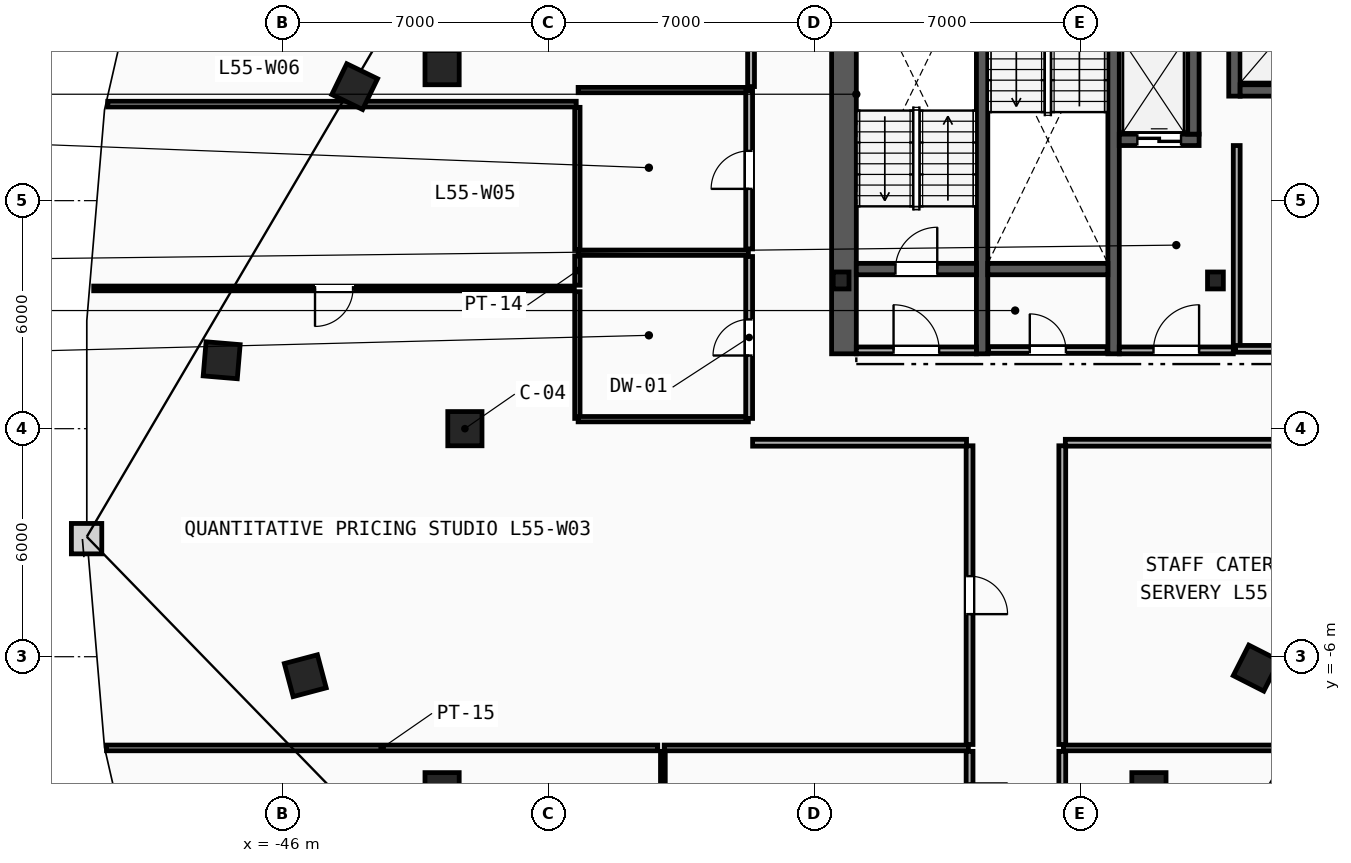
"""IFC4 building model, lengths in metres.
Left out: names, types, materials, properties, quantities, classifications, styles, units other than length and angle.
Written with IfcOpenShell. Run it as: python <this file> out.ifc"""

import sys

from ifc_helpers import new_model, si_unit, direction, frame, frame_2d, origin, origin_2d, place, context, subcontext, project, spatial, rectangle, i_section, extrude, element, fill, save


model = new_model("IFC4")
c1 = context("Model", 3, precision=1e-05, world=origin(), true_north=direction((0.0, 1.0)))
c2 = subcontext(c1, "Body", "Model", "MODEL_VIEW")
j1 = project(units=[si_unit("LENGTHUNIT", "METRE"), si_unit("PLANEANGLEUNIT", "RADIAN")], contexts=[c1])
p1 = place(None, origin())
s1 = spatial("IfcSite", under=j1, at=p1, CompositionType="ELEMENT")
p2 = place(p1, origin())
s2 = spatial("IfcBuilding", under=s1, at=p2, CompositionType="ELEMENT")
p3 = place(p2, frame((0.0, 0.0, 209.8)))
s3 = spatial("IfcBuildingStorey", under=s2, at=p3, CompositionType="ELEMENT", Elevation=209.8)
for number, where, z_axis, x_axis in (
    (1, (-31.3, 3.9, 0.0), (0.0, 0.0, 1.0), (1.0, 0.0, 0.0)),
    (2, (-21.45, 3.9, 0.0), (0.0, 0.0, 1.0), (1.0, 0.0, 0.0)),
):
    element("IfcColumn", number, at=place(p3, frame(where, z_axis=z_axis, x_axis=x_axis)), inside=s3, PredefinedType="COLUMN", context=c2, shape_type="SweptSolid", body=[
        extrude(i_section(OverallWidth=0.416, OverallDepth=0.446, WebThickness=0.039, FlangeThickness=0.063, FilletRadius=0.018, at=origin_2d()), origin(), (0.0, 0.0, 1.0), 3.6),
    ])
for number, where, z_axis, x_axis in (
    (3, (-41.2, 0.0, 0.0), (0.0, 0.0, 1.0), (1.0, 0.0, 0.0)),
    (4, (-41.8, 9.5, 0.0), (0.0, 0.0, 1.0), (1.0, 0.0, 0.0)),
    (5, (-41.8, -9.5, 0.0), (0.0, 0.0, 1.0), (1.0, 0.0, 0.0)),
    (6, (-23.2, -9.5, 0.0), (0.0, 0.0, 1.0), (1.0, 0.0, 0.0)),
    (7, (-44.1, 9.0, 0.0), (0.0, 0.0, 1.0), (-0.437, -0.899, 0.0)),
    (8, (-47.6, 1.8, 0.0), (0.0, 0.0, 1.0), (-0.084, -0.997, 0.0)),
    (9, (-45.4, -6.5, 0.0), (0.0, 0.0, 1.0), (0.256, -0.967, 0.0)),
    (10, (-20.375, -6.3, 0.0), (0.0, 0.0, 1.0), (0.453, 0.892, 0.0)),
):
    element("IfcColumn", number, at=place(p3, frame(where, z_axis=z_axis, x_axis=x_axis)), inside=s3, PredefinedType="COLUMN", context=c2, shape_type="SweptSolid", body=[
        extrude(rectangle(XDim=0.9, YDim=0.9, at=origin_2d()), origin(), (0.0, 0.0, 1.0), 3.6),
    ])
p4 = place(p3, frame((-31.225, 1.97, 0.0), z_axis=(0.0, 0.0, 1.0), x_axis=(0.0, 1.0, 0.0)))
e11 = element("IfcWall", 11, at=p4, inside=s3, PredefinedType="SHEAR", context=c2, shape_type="SweptSolid", body=[
    extrude(rectangle(XDim=13.33, YDim=0.65, at=frame_2d((6.665, 0.0))), origin(), (0.0, 0.0, 1.0), 3.34),
])
for number, where, z_axis, x_axis in (
    (12, (-27.59, 1.97, 0.0), (0.0, 0.0, 1.0), (0.0, 1.0, 0.0)),
    (13, (-24.13, 1.97, 0.0), (0.0, 0.0, 1.0), (0.0, 1.0, 0.0)),
):
    element("IfcWall", number, at=place(p3, frame(where, z_axis=z_axis, x_axis=x_axis)), inside=s3, PredefinedType="SHEAR", context=c2, shape_type="SweptSolid", body=[
        extrude(rectangle(XDim=10.68, YDim=0.3, at=frame_2d((5.34, 0.0))), origin(), (0.0, 0.0, 1.0), 3.34),
    ])
p5 = place(p3, frame((-30.9, 4.2, 0.0), z_axis=(0.0, 0.0, 1.0), x_axis=(1.0, 0.0, 0.0)))
e14 = element("IfcWall", 14, at=p5, inside=s3, PredefinedType="SHEAR", context=c2, shape_type="SweptSolid", body=[
    extrude(rectangle(XDim=3.16, YDim=0.3, at=frame_2d((1.58, 0.0))), origin(), (0.0, 0.0, 1.0), 3.34),
])
p6 = place(p5, frame((1.03, 0.0, 0.0)))
e15 = element("IfcOpeningElement", 15, at=p6, cuts=e14, PredefinedType="OPENING", context=c2, shape_type="SweptSolid", body=[
    extrude(rectangle(XDim=1.1, YDim=2.15, at=frame_2d((0.55, 1.075))), frame((0.0, 0.16, 0.0), z_axis=(0.0, -1.0, 0.0), x_axis=(1.0, 0.0, 0.0)), (0.0, 0.0, 1.0), 0.32),
])
p7 = place(p3, frame((-27.44, 4.2, 0.0), z_axis=(0.0, 0.0, 1.0), x_axis=(1.0, 0.0, 0.0)))
e16 = element("IfcWall", 16, at=p7, inside=s3, PredefinedType="SHEAR", context=c2, shape_type="SweptSolid", body=[
    extrude(rectangle(XDim=3.16, YDim=0.3, at=frame_2d((1.58, 0.0))), origin(), (0.0, 0.0, 1.0), 3.34),
])
p8 = place(p3, frame((-20.89, 2.15, 0.0), z_axis=(0.0, 0.0, 1.0), x_axis=(0.0, 1.0, 0.0)))
e17 = element("IfcWall", 17, at=p8, inside=s3, PredefinedType="PARTITIONING", context=c2, shape_type="SweptSolid", body=[
    extrude(rectangle(XDim=5.3, YDim=0.18, at=frame_2d((2.65, 0.0))), origin(), (0.0, 0.0, 1.0), 3.34),
])
p9 = place(p3, frame((-23.98, 2.06, 0.0), z_axis=(0.0, 0.0, 1.0), x_axis=(1.0, 0.0, 0.0)))
e18 = element("IfcWall", 18, at=p9, inside=s3, PredefinedType="PARTITIONING", context=c2, shape_type="SweptSolid", body=[
    extrude(rectangle(XDim=3.0, YDim=0.18, at=frame_2d((1.5, 0.0))), origin(), (0.0, 0.0, 1.0), 3.34),
])
p10 = place(p9, frame((0.9, 0.0, 0.0)))
e19 = element("IfcOpeningElement", 19, at=p10, cuts=e18, PredefinedType="OPENING", context=c2, shape_type="SweptSolid", body=[
    extrude(rectangle(XDim=1.2, YDim=2.15, at=frame_2d((0.6, 1.075))), frame((0.0, 0.1, 0.0), z_axis=(0.0, -1.0, 0.0), x_axis=(1.0, 0.0, 0.0)), (0.0, 0.0, 1.0), 0.2),
])
p11 = place(p3, frame((-30.9, 2.06, 0.0), z_axis=(0.0, 0.0, 1.0), x_axis=(1.0, 0.0, 0.0)))
e20 = element("IfcWall", 20, at=p11, inside=s3, PredefinedType="PARTITIONING", context=c2, shape_type="SweptSolid", body=[
    extrude(rectangle(XDim=3.16, YDim=0.18, at=frame_2d((1.58, 0.0))), origin(), (0.0, 0.0, 1.0), 3.34),
])
p12 = place(p11, frame((0.98, 0.0, 0.0)))
e21 = element("IfcOpeningElement", 21, at=p12, cuts=e20, PredefinedType="OPENING", context=c2, shape_type="SweptSolid", body=[
    extrude(rectangle(XDim=1.2, YDim=2.15, at=frame_2d((0.6, 1.075))), frame((0.0, 0.1, 0.0), z_axis=(0.0, -1.0, 0.0), x_axis=(1.0, 0.0, 0.0)), (0.0, 0.0, 1.0), 0.2),
])
p13 = place(p3, frame((-23.98, 7.6, 0.0), z_axis=(0.0, 0.0, 1.0), x_axis=(1.0, 0.0, 0.0)))
e22 = element("IfcWall", 22, at=p13, inside=s3, PredefinedType="SHEAR", context=c2, shape_type="SweptSolid", body=[
    extrude(rectangle(XDim=2.1, YDim=0.3, at=frame_2d((1.05, 0.0))), origin(), (0.0, 0.0, 1.0), 3.34),
])
p14 = place(p13, frame((0.475, 0.0, 0.0)))
e23 = element("IfcOpeningElement", 23, at=p14, cuts=e22, PredefinedType="OPENING", context=c2, shape_type="SweptSolid", body=[
    extrude(rectangle(XDim=1.15, YDim=2.2, at=frame_2d((0.575, 1.1))), frame((0.0, 0.16, 0.0), z_axis=(0.0, -1.0, 0.0), x_axis=(1.0, 0.0, 0.0)), (0.0, 0.0, 1.0), 0.32),
])
p15 = place(p3, frame((-22.03, 7.75, 0.0), z_axis=(0.0, 0.0, 1.0), x_axis=(0.0, 1.0, 0.0)))
e24 = element("IfcWall", 24, at=p15, inside=s3, PredefinedType="SHEAR", context=c2, shape_type="SweptSolid", body=[
    extrude(rectangle(XDim=2.5, YDim=0.3, at=frame_2d((1.25, 0.0))), origin(), (0.0, 0.0, 1.0), 3.34),
])
p16 = place(p3, frame((-20.95, 8.75, 0.0), z_axis=(0.0, 0.0, 1.0), x_axis=(0.0, 1.0, 0.0)))
e25 = element("IfcWall", 25, at=p16, inside=s3, PredefinedType="SHEAR", context=c2, shape_type="SweptSolid", body=[
    extrude(rectangle(XDim=5.25, YDim=0.3, at=frame_2d((2.625, 0.0))), origin(), (0.0, 0.0, 1.0), 3.34),
])
p17 = place(p3, frame((-20.8, 8.9, 0.0), z_axis=(0.0, 0.0, 1.0), x_axis=(1.0, 0.0, 0.0)))
e26 = element("IfcWall", 26, at=p17, inside=s3, PredefinedType="SHEAR", context=c2, shape_type="SweptSolid", body=[
    extrude(rectangle(XDim=2.15, YDim=0.3, at=frame_2d((1.075, 0.0))), origin(), (0.0, 0.0, 1.0), 3.34),
])
p18 = place(p3, frame((-27.42, 2.07, 0.0), z_axis=(0.0, 0.0, 1.0), x_axis=(1.0, 0.0, 0.0)))
e27 = element("IfcWall", 27, at=p18, inside=s3, PredefinedType="PARTITIONING", context=c2, shape_type="SweptSolid", body=[
    extrude(rectangle(XDim=3.12, YDim=0.18, at=frame_2d((1.56, 0.0))), origin(), (0.0, 0.0, 1.0), 3.34),
])
p19 = place(p18, frame((1.085, 0.0, 0.0)))
e28 = element("IfcOpeningElement", 28, at=p19, cuts=e27, PredefinedType="OPENING", context=c2, shape_type="SweptSolid", body=[
    extrude(rectangle(XDim=0.95, YDim=2.1, at=frame_2d((0.475, 1.05))), frame((0.0, 0.1, 0.0), z_axis=(0.0, -1.0, 0.0), x_axis=(1.0, 0.0, 0.0)), (0.0, 0.0, 1.0), 0.2),
])
p20 = place(p3, frame((-38.24, 0.27, 0.0), z_axis=(0.0, 0.0, 1.0), x_axis=(0.0, 1.0, 0.0)))
e29 = element("IfcWall", 29, at=p20, inside=s3, PredefinedType="PARTITIONING", context=c2, shape_type="SweptSolid", body=[
    extrude(rectangle(XDim=3.335, YDim=0.14, at=frame_2d((1.667, 0.0))), origin(), (0.0, 0.0, 1.0), 3.34),
])
p21 = place(p3, frame((-38.24, 3.775, 0.0), z_axis=(0.0, 0.0, 1.0), x_axis=(0.0, 1.0, 0.0)))
e30 = element("IfcWall", 30, at=p21, inside=s3, PredefinedType="PARTITIONING", context=c2, shape_type="SweptSolid", body=[
    extrude(rectangle(XDim=0.77, YDim=0.14, at=frame_2d((0.385, 0.0))), origin(), (0.0, 0.0, 1.0), 3.34),
])
p22 = place(p3, frame((-38.24, 4.715, 0.0), z_axis=(0.0, 0.0, 1.0), x_axis=(0.0, 1.0, 0.0)))
e31 = element("IfcWall", 31, at=p22, inside=s3, PredefinedType="PARTITIONING", context=c2, shape_type="SweptSolid", body=[
    extrude(rectangle(XDim=3.74, YDim=0.14, at=frame_2d((1.87, 0.0))), origin(), (0.0, 0.0, 1.0), 3.34),
])
for number, where, z_axis, x_axis in (
    (32, (-38.22, 0.25, 0.0), (0.0, 0.0, 1.0), (1.0, 0.0, 0.0)),
    (33, (-38.22, 4.63, 0.0), (0.0, 0.0, 1.0), (1.0, 0.0, 0.0)),
    (34, (-38.22, 8.91, 0.0), (0.0, 0.0, 1.0), (1.0, 0.0, 0.0)),
):
    element("IfcWall", number, at=place(p3, frame(where, z_axis=z_axis, x_axis=x_axis)), inside=s3, PredefinedType="PARTITIONING", context=c2, shape_type="SweptSolid", body=[
        extrude(rectangle(XDim=4.48, YDim=0.14, at=frame_2d((2.24, 0.0))), origin(), (0.0, 0.0, 1.0), 3.34),
    ])
p23 = place(p3, frame((-33.72, 0.27, 0.0), z_axis=(0.0, 0.0, 1.0), x_axis=(0.0, 1.0, 0.0)))
e35 = element("IfcWall", 35, at=p23, inside=s3, PredefinedType="PARTITIONING", context=c2, shape_type="SweptSolid", body=[
    extrude(rectangle(XDim=4.26, YDim=0.18, at=frame_2d((2.13, 0.0))), origin(), (0.0, 0.0, 1.0), 3.34),
])
p24 = place(p23, frame((1.655, 0.0, 0.0)))
e36 = element("IfcOpeningElement", 36, at=p24, cuts=e35, PredefinedType="OPENING", context=c2, shape_type="SweptSolid", body=[
    extrude(rectangle(XDim=0.95, YDim=2.1, at=frame_2d((0.475, 1.05))), frame((0.0, 0.1, 0.0), z_axis=(0.0, -1.0, 0.0), x_axis=(1.0, 0.0, 0.0)), (0.0, 0.0, 1.0), 0.2),
])
p25 = place(p3, frame((-33.72, 4.73, 0.0), z_axis=(0.0, 0.0, 1.0), x_axis=(0.0, 1.0, 0.0)))
e37 = element("IfcWall", 37, at=p25, inside=s3, PredefinedType="PARTITIONING", context=c2, shape_type="SweptSolid", body=[
    extrude(rectangle(XDim=4.16, YDim=0.18, at=frame_2d((2.08, 0.0))), origin(), (0.0, 0.0, 1.0), 3.34),
])
p26 = place(p25, frame((1.58, 0.0, 0.0)))
e38 = element("IfcOpeningElement", 38, at=p26, cuts=e37, PredefinedType="OPENING", context=c2, shape_type="SweptSolid", body=[
    extrude(rectangle(XDim=1.0, YDim=2.15, at=frame_2d((0.5, 1.075))), frame((0.0, 0.1, 0.0), z_axis=(0.0, -1.0, 0.0), x_axis=(1.0, 0.0, 0.0)), (0.0, 0.0, 1.0), 0.2),
])
p27 = place(p3, frame((-50.63, -8.4, 0.0), z_axis=(0.0, 0.0, 1.0), x_axis=(1.0, 0.0, 0.0)))
e39 = element("IfcWall", 39, at=p27, inside=s3, PredefinedType="PARTITIONING", context=c2, shape_type="SweptSolid", body=[
    extrude(rectangle(XDim=14.505, YDim=0.15, at=frame_2d((7.252, 0.0))), origin(), (0.0, 0.0, 1.0), 3.34),
])
p28 = place(p3, frame((-35.955, -8.4, 0.0), z_axis=(0.0, 0.0, 1.0), x_axis=(1.0, 0.0, 0.0)))
e40 = element("IfcWall", 40, at=p28, inside=s3, PredefinedType="PARTITIONING", context=c2, shape_type="SweptSolid", body=[
    extrude(rectangle(XDim=8.005, YDim=0.15, at=frame_2d((4.002, 0.0))), origin(), (0.0, 0.0, 1.0), 3.34),
])
p29 = place(p3, frame((-25.45, -8.4, 0.0), z_axis=(0.0, 0.0, 1.0), x_axis=(1.0, 0.0, 0.0)))
e41 = element("IfcWall", 41, at=p29, inside=s3, PredefinedType="PARTITIONING", context=c2, shape_type="SweptSolid", body=[
    extrude(rectangle(XDim=12.08, YDim=0.15, at=frame_2d((6.04, 0.0))), origin(), (0.0, 0.0, 1.0), 3.34),
])
p30 = place(p3, frame((-50.598, 8.54, 0.0), z_axis=(0.0, 0.0, 1.0), x_axis=(1.0, 0.0, 0.0)))
e42 = element("IfcWall", 42, at=p30, inside=s3, PredefinedType="PARTITIONING", context=c2, shape_type="SweptSolid", body=[
    extrude(rectangle(XDim=12.328, YDim=0.15, at=frame_2d((6.164, 0.0))), origin(), (0.0, 0.0, 1.0), 3.34),
])
p31 = place(p3, frame((-27.92, -8.49, 0.0), z_axis=(0.0, 0.0, 1.0), x_axis=(0.0, -1.0, 0.0)))
e43 = element("IfcWall", 43, at=p31, inside=s3, PredefinedType="PARTITIONING", context=c2, shape_type="SweptSolid", body=[
    extrude(rectangle(XDim=2.688, YDim=0.18, at=frame_2d((1.344, 0.0))), origin(), (0.0, 0.0, 1.0), 3.34),
])
p32 = place(p31, frame((0.844, 0.0, 0.0)))
e44 = element("IfcOpeningElement", 44, at=p32, cuts=e43, PredefinedType="OPENING", context=c2, shape_type="SweptSolid", body=[
    extrude(rectangle(XDim=1.0, YDim=2.15, at=frame_2d((0.5, 1.075))), frame((0.0, 0.1, 0.0), z_axis=(0.0, -1.0, 0.0), x_axis=(1.0, 0.0, 0.0)), (0.0, 0.0, 1.0), 0.2),
])
p33 = place(p3, frame((-25.48, -11.178, 0.0), z_axis=(0.0, 0.0, 1.0), x_axis=(0.0, 1.0, 0.0)))
e45 = element("IfcWall", 45, at=p33, inside=s3, PredefinedType="PARTITIONING", context=c2, shape_type="SweptSolid", body=[
    extrude(rectangle(XDim=2.688, YDim=0.18, at=frame_2d((1.344, 0.0))), origin(), (0.0, 0.0, 1.0), 3.34),
])
p34 = place(p3, frame((-27.92, -0.45, 0.0), z_axis=(0.0, 0.0, 1.0), x_axis=(0.0, -1.0, 0.0)))
e46 = element("IfcWall", 46, at=p34, inside=s3, PredefinedType="PARTITIONING", context=c2, shape_type="SweptSolid", body=[
    extrude(rectangle(XDim=7.86, YDim=0.18, at=frame_2d((3.93, 0.0))), origin(), (0.0, 0.0, 1.0), 3.34),
])
p35 = place(p34, frame((3.43, 0.0, 0.0)))
e47 = element("IfcOpeningElement", 47, at=p35, cuts=e46, PredefinedType="OPENING", context=c2, shape_type="SweptSolid", body=[
    extrude(rectangle(XDim=1.0, YDim=2.15, at=frame_2d((0.5, 1.075))), frame((0.0, 0.1, 0.0), z_axis=(0.0, -1.0, 0.0), x_axis=(1.0, 0.0, 0.0)), (0.0, 0.0, 1.0), 0.2),
])
p36 = place(p3, frame((-33.628, -0.37, 0.0), z_axis=(0.0, 0.0, 1.0), x_axis=(1.0, 0.0, 0.0)))
e48 = element("IfcWall", 48, at=p36, inside=s3, PredefinedType="PARTITIONING", context=c2, shape_type="SweptSolid", body=[
    extrude(rectangle(XDim=5.628, YDim=0.18, at=frame_2d((2.814, 0.0))), origin(), (0.0, 0.0, 1.0), 3.34),
])
p37 = place(p3, frame((-25.4, -0.37, 0.0), z_axis=(0.0, 0.0, 1.0), x_axis=(1.0, 0.0, 0.0)))
e49 = element("IfcWall", 49, at=p37, inside=s3, PredefinedType="PARTITIONING", context=c2, shape_type="SweptSolid", body=[
    extrude(rectangle(XDim=8.578, YDim=0.18, at=frame_2d((4.289, 0.0))), origin(), (0.0, 0.0, 1.0), 3.34),
])
p38 = place(p3, frame((-25.48, -8.31, 0.0), z_axis=(0.0, 0.0, 1.0), x_axis=(0.0, 1.0, 0.0)))
e50 = element("IfcWall", 50, at=p38, inside=s3, PredefinedType="PARTITIONING", context=c2, shape_type="SweptSolid", body=[
    extrude(rectangle(XDim=7.86, YDim=0.18, at=frame_2d((3.93, 0.0))), origin(), (0.0, 0.0, 1.0), 3.34),
])
p39 = place(p3, frame((-16.822, 2.1, 0.0), z_axis=(0.0, 0.0, 1.0), x_axis=(-1.0, 0.0, 0.0)))
e51 = element("IfcWall", 51, at=p39, inside=s3, PredefinedType="PARTITIONING", context=c2, shape_type="SweptSolid", body=[
    extrude(rectangle(XDim=4.098, YDim=0.18, at=frame_2d((2.049, 0.0))), origin(), (0.0, 0.0, 1.0), 3.34),
])
p40 = place(p3, frame((-33.67, 10.3, 0.0), z_axis=(0.0, 0.0, 1.0), x_axis=(0.0, -1.0, 0.0)))
e52 = element("IfcWall", 52, at=p40, inside=s3, PredefinedType="PARTITIONING", context=c2, shape_type="SweptSolid", body=[
    extrude(rectangle(XDim=1.299, YDim=0.18, at=frame_2d((0.649, 0.0))), origin(), (0.0, 0.0, 1.0), 3.34),
])
p41 = place(p3, frame((-35.99, -8.49, 0.0), z_axis=(0.0, 0.0, 1.0), x_axis=(0.0, -1.0, 0.0)))
e53 = element("IfcWall", 53, at=p41, inside=s3, PredefinedType="PARTITIONING", context=c2, shape_type="SweptSolid", body=[
    extrude(rectangle(XDim=16.275, YDim=0.125, at=frame_2d((8.137, 0.0))), origin(), (0.0, 0.0, 1.0), 3.34),
])
p42 = place(p41, frame((7.637, 0.0, 0.0)))
e54 = element("IfcOpeningElement", 54, at=p42, cuts=e53, PredefinedType="OPENING", context=c2, shape_type="SweptSolid", body=[
    extrude(rectangle(XDim=1.0, YDim=2.15, at=frame_2d((0.5, 1.075))), frame((0.0, 0.073, 0.0), z_axis=(0.0, -1.0, 0.0), x_axis=(1.0, 0.0, 0.0)), (0.0, 0.0, 1.0), 0.145),
])
p43 = place(p3, frame((-38.32, 3.69, 0.0), z_axis=(0.0, 0.0, 1.0), x_axis=(-1.0, 0.0, 0.0)))
e55 = element("IfcWall", 55, at=p43, inside=s3, PredefinedType="PARTITIONING", context=c2, shape_type="SweptSolid", body=[
    extrude(rectangle(XDim=12.647, YDim=0.125, at=frame_2d((6.324, 0.0))), origin(), (0.0, 0.0, 1.0), 3.34),
])
p44 = place(p43, frame((5.824, 0.0, 0.0)))
e56 = element("IfcOpeningElement", 56, at=p44, cuts=e55, PredefinedType="OPENING", context=c2, shape_type="SweptSolid", body=[
    extrude(rectangle(XDim=1.0, YDim=2.15, at=frame_2d((0.5, 1.075))), frame((0.0, 0.073, 0.0), z_axis=(0.0, -1.0, 0.0), x_axis=(1.0, 0.0, 0.0)), (0.0, 0.0, 1.0), 0.145),
])
p45 = place(p6, origin())
e57 = element("IfcDoor", 57, at=p45, inside=s3, OperationType="SINGLE_SWING_RIGHT", PredefinedType="DOOR", context=c2, shape_type="SweptSolid", body=[
    extrude(rectangle(XDim=1.1, YDim=2.15, at=frame_2d((0.55, 1.075))), frame((0.0, 0.025, 0.0), z_axis=(0.0, -1.0, 0.0), x_axis=(1.0, 0.0, 0.0)), (0.0, 0.0, 1.0), 0.05),
])
fill(e15, e57)
p46 = place(p10, origin())
e58 = element("IfcDoor", 58, at=p46, inside=s3, OperationType="SINGLE_SWING_RIGHT", PredefinedType="DOOR", context=c2, shape_type="SweptSolid", body=[
    extrude(rectangle(XDim=1.2, YDim=2.15, at=frame_2d((0.6, 1.075))), frame((0.0, 0.025, 0.0), z_axis=(0.0, -1.0, 0.0), x_axis=(1.0, 0.0, 0.0)), (0.0, 0.0, 1.0), 0.05),
])
fill(e19, e58)
p47 = place(p12, origin())
e59 = element("IfcDoor", 59, at=p47, inside=s3, OperationType="SINGLE_SWING_LEFT", PredefinedType="DOOR", context=c2, shape_type="SweptSolid", body=[
    extrude(rectangle(XDim=1.2, YDim=2.15, at=frame_2d((0.6, 1.075))), frame((0.0, 0.025, 0.0), z_axis=(0.0, -1.0, 0.0), x_axis=(1.0, 0.0, 0.0)), (0.0, 0.0, 1.0), 0.05),
])
fill(e21, e59)
p48 = place(p14, origin())
e60 = element("IfcDoor", 60, at=p48, inside=s3, OperationType="SLIDING_TO_LEFT", PredefinedType="TRAPDOOR", context=c2, shape_type="SweptSolid", body=[
    extrude(rectangle(XDim=1.15, YDim=2.2, at=frame_2d((0.575, 1.1))), frame((0.0, 0.025, 0.0), z_axis=(0.0, -1.0, 0.0), x_axis=(1.0, 0.0, 0.0)), (0.0, 0.0, 1.0), 0.05),
])
fill(e23, e60)
p49 = place(p44, origin())
e61 = element("IfcDoor", 61, at=p49, inside=s3, OperationType="SINGLE_SWING_RIGHT", PredefinedType="DOOR", context=c2, shape_type="SweptSolid", body=[
    extrude(rectangle(XDim=1.0, YDim=2.15, at=frame_2d((0.5, 1.075))), frame((0.0, 0.025, 0.0), z_axis=(0.0, -1.0, 0.0), x_axis=(1.0, 0.0, 0.0)), (0.0, 0.0, 1.0), 0.05),
])
fill(e56, e61)
p50 = place(p35, origin())
e62 = element("IfcDoor", 62, at=p50, inside=s3, OperationType="SINGLE_SWING_RIGHT", PredefinedType="DOOR", context=c2, shape_type="SweptSolid", body=[
    extrude(rectangle(XDim=1.0, YDim=2.15, at=frame_2d((0.5, 1.075))), frame((0.0, 0.025, 0.0), z_axis=(0.0, -1.0, 0.0), x_axis=(1.0, 0.0, 0.0)), (0.0, 0.0, 1.0), 0.05),
])
fill(e47, e62)
p51 = place(p24, origin())
e63 = element("IfcDoor", 63, at=p51, inside=s3, OperationType="SINGLE_SWING_LEFT", PredefinedType="DOOR", context=c2, shape_type="SweptSolid", body=[
    extrude(rectangle(XDim=0.95, YDim=2.1, at=frame_2d((0.475, 1.05))), frame((0.0, 0.025, 0.0), z_axis=(0.0, -1.0, 0.0), x_axis=(1.0, 0.0, 0.0)), (0.0, 0.0, 1.0), 0.05),
])
fill(e36, e63)
p52 = place(p26, origin())
e64 = element("IfcDoor", 64, at=p52, inside=s3, OperationType="SINGLE_SWING_LEFT", PredefinedType="DOOR", context=c2, shape_type="SweptSolid", body=[
    extrude(rectangle(XDim=1.0, YDim=2.15, at=frame_2d((0.5, 1.075))), frame((0.0, 0.025, 0.0), z_axis=(0.0, -1.0, 0.0), x_axis=(1.0, 0.0, 0.0)), (0.0, 0.0, 1.0), 0.05),
])
fill(e38, e64)
p53 = place(p19, origin())
e65 = element("IfcDoor", 65, at=p53, inside=s3, OperationType="SINGLE_SWING_LEFT", PredefinedType="DOOR", context=c2, shape_type="SweptSolid", body=[
    extrude(rectangle(XDim=0.95, YDim=2.1, at=frame_2d((0.475, 1.05))), frame((0.0, 0.025, 0.0), z_axis=(0.0, -1.0, 0.0), x_axis=(1.0, 0.0, 0.0)), (0.0, 0.0, 1.0), 0.05),
])
fill(e28, e65)
save(model, sys.argv[1])
